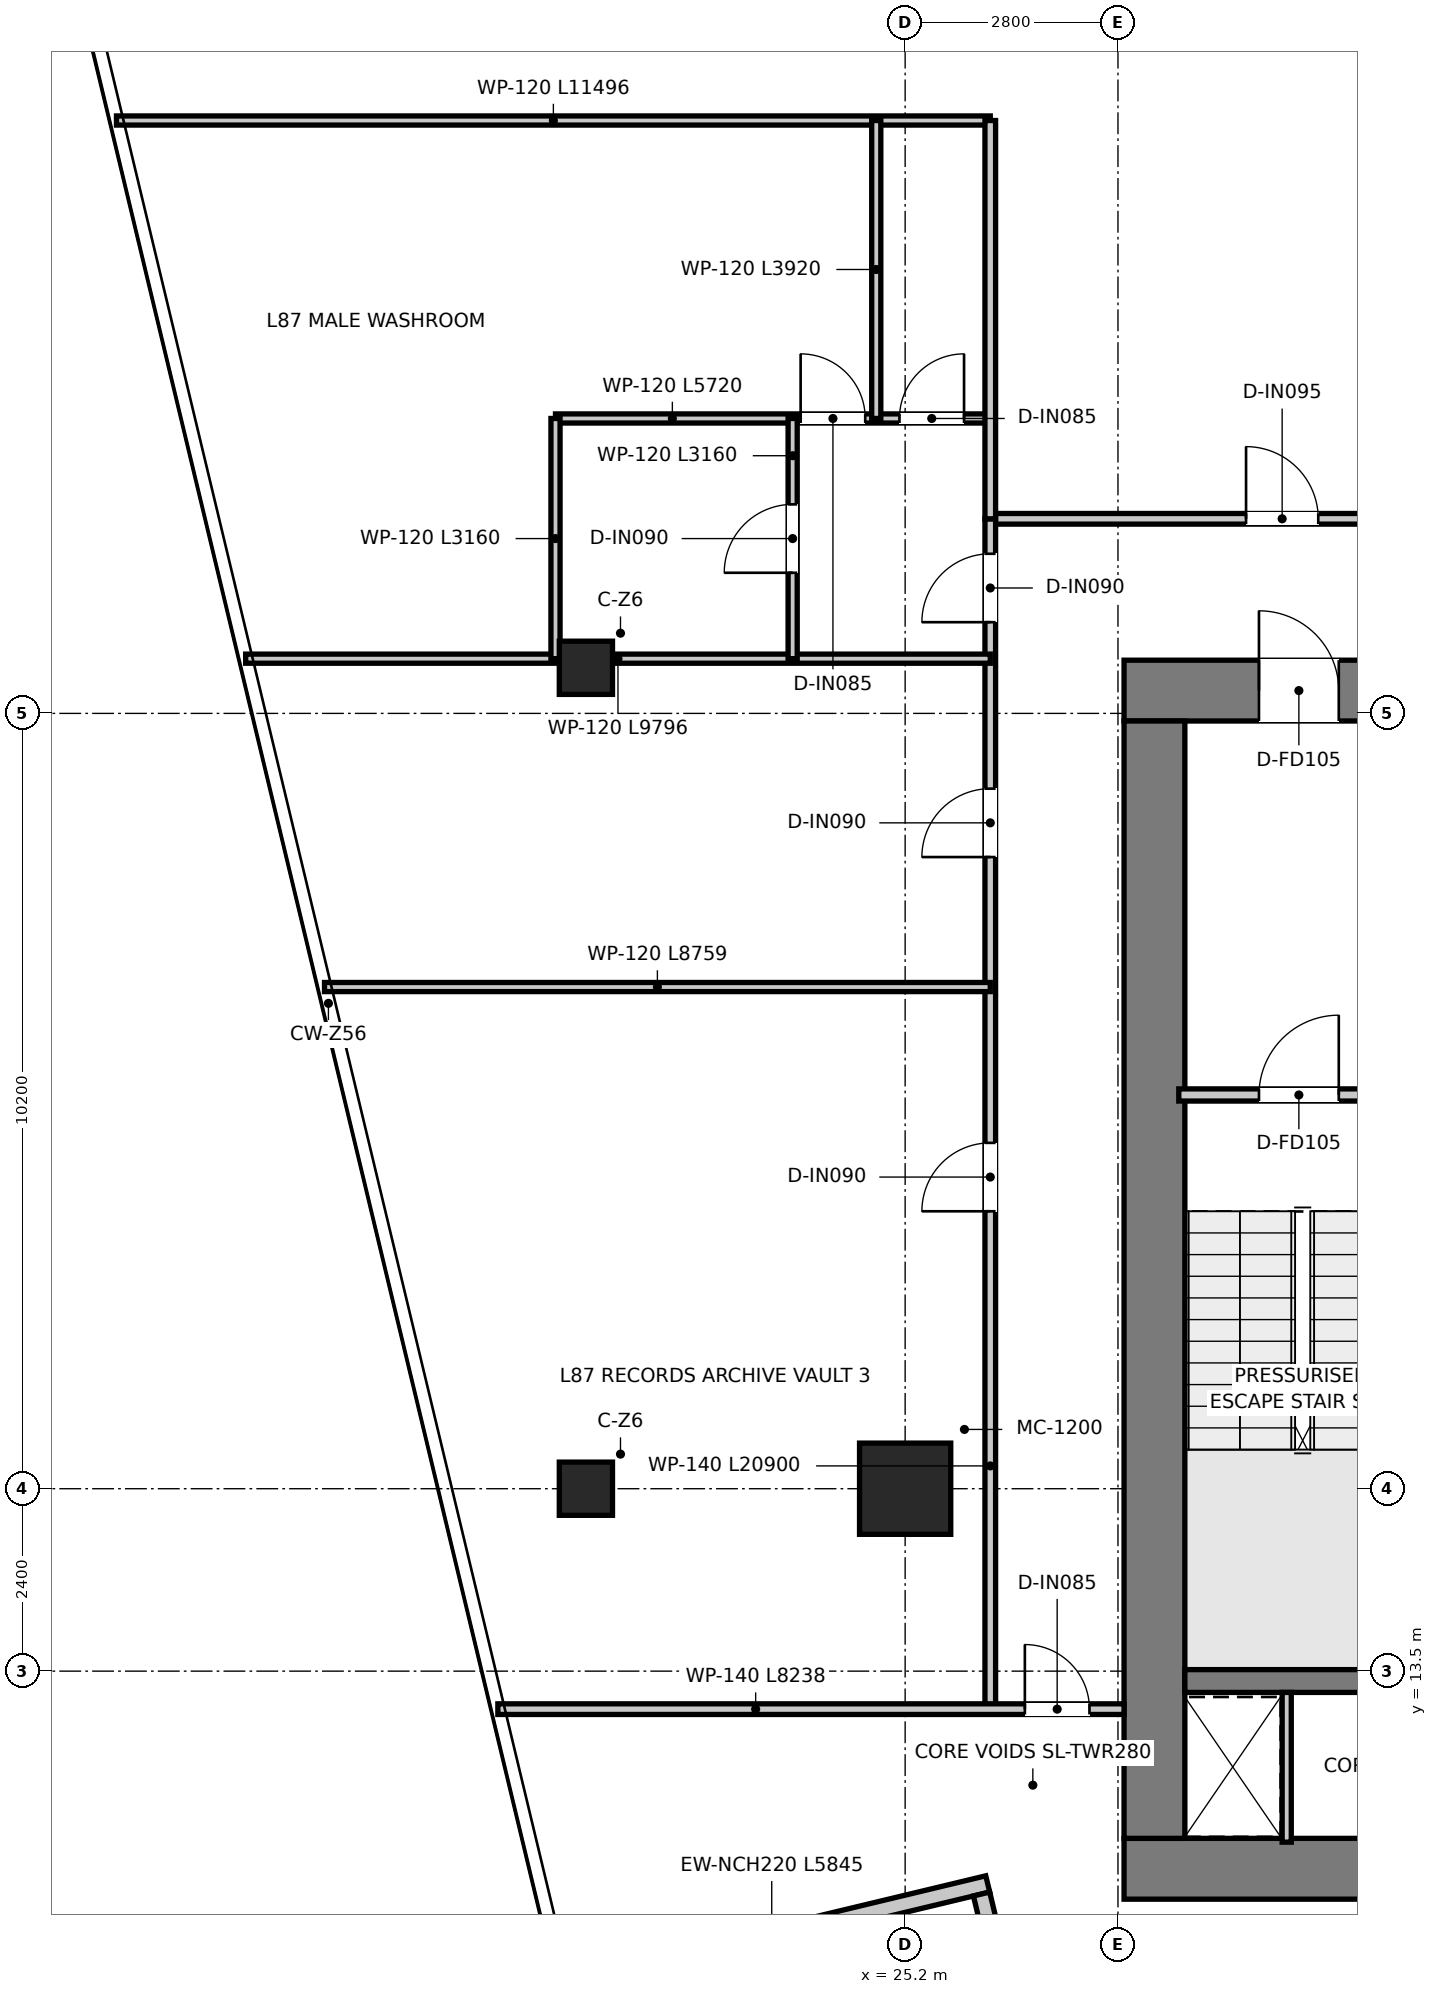
"""IFC4 building model, lengths in metres.
Left out: names, types, materials, properties, quantities, classifications, styles, units other than length and angle.
Written with IfcOpenShell. Run it as: python <this file> out.ifc"""

import sys

from ifc_helpers import new_model, si_unit, direction, frame, frame_2d, origin, origin_2d, place, context, subcontext, project, spatial, rectangle, extrude, source, transform, mapped, element, fill, save


model = new_model("IFC4")
c1 = context("Model", 3, precision=1e-05, world=origin(), true_north=direction((0.0, 1.0)))
c2 = subcontext(c1, "Body", "Model", "MODEL_VIEW")
j1 = project(units=[si_unit("LENGTHUNIT", "METRE"), si_unit("PLANEANGLEUNIT", "RADIAN")], contexts=[c1])
p1 = place(None, origin())
s1 = spatial("IfcSite", under=j1, at=p1, CompositionType="ELEMENT")
p2 = place(p1, origin())
s2 = spatial("IfcBuilding", under=s1, at=p2, CompositionType="ELEMENT")
p3 = place(p2, frame((0.0, 0.0, 355.35)))
s3 = spatial("IfcBuildingStorey", under=s2, at=p3, CompositionType="ELEMENT", Elevation=355.35)
p4 = place(p3, frame((28.08, 10.9, 0.0), z_axis=(0.0, 0.0, 1.0), x_axis=(1.0, 0.0, 0.0)))
e1 = element("IfcWall", 1, at=p4, inside=s3, PredefinedType="SHEAR", context=c2, shape_type="SweptSolid", body=[
    extrude(rectangle(XDim=15.84, YDim=0.8, at=frame_2d((7.92, 0.0))), origin(), (0.0, 0.0, 1.0), 3.95),
])
p5 = place(p3, frame((28.08, 26.4, 0.0), z_axis=(0.0, 0.0, 1.0), x_axis=(1.0, 0.0, 0.0)))
e2 = element("IfcWall", 2, at=p5, inside=s3, PredefinedType="SHEAR", context=c2, shape_type="SweptSolid", body=[
    extrude(rectangle(XDim=15.84, YDim=0.8, at=frame_2d((7.92, 0.0))), origin(), (0.0, 0.0, 1.0), 3.95),
])
p6 = place(p5, frame((7.22, 0.0, 0.0)))
e3 = element("IfcOpeningElement", 3, at=p6, cuts=e2, PredefinedType="OPENING", context=c2, shape_type="SweptSolid", body=[
    extrude(rectangle(XDim=1.4, YDim=2.2, at=frame_2d((0.7, 1.1))), frame((0.0, 0.41, 0.0), z_axis=(0.0, -1.0, 0.0), x_axis=(1.0, 0.0, 0.0)), (0.0, 0.0, 1.0), 0.82),
])
p7 = place(p5, frame((1.775, 0.0, 0.0)))
e4 = element("IfcOpeningElement", 4, at=p7, cuts=e2, PredefinedType="OPENING", context=c2, shape_type="SweptSolid", body=[
    extrude(rectangle(XDim=1.05, YDim=2.1, at=frame_2d((0.525, 1.05))), frame((0.0, 0.41, 0.0), z_axis=(0.0, -1.0, 0.0), x_axis=(1.0, 0.0, 0.0)), (0.0, 0.0, 1.0), 0.82),
])
p8 = place(p5, frame((13.015, 0.0, 0.0)))
e5 = element("IfcOpeningElement", 5, at=p8, cuts=e2, PredefinedType="OPENING", context=c2, shape_type="SweptSolid", body=[
    extrude(rectangle(XDim=1.05, YDim=2.1, at=frame_2d((0.525, 1.05))), frame((0.0, 0.41, 0.0), z_axis=(0.0, -1.0, 0.0), x_axis=(1.0, 0.0, 0.0)), (0.0, 0.0, 1.0), 0.82),
])
p9 = place(p3, frame((28.48, 11.3, 0.0), z_axis=(0.0, 0.0, 1.0), x_axis=(0.0, 1.0, 0.0)))
e6 = element("IfcWall", 6, at=p9, inside=s3, PredefinedType="SHEAR", context=c2, shape_type="SweptSolid", body=[
    extrude(rectangle(XDim=14.7, YDim=0.8, at=frame_2d((7.35, 0.0))), origin(), (0.0, 0.0, 1.0), 3.95),
])
p10 = place(p3, frame((28.88, 13.37, 0.0), z_axis=(0.0, 0.0, 1.0), x_axis=(1.0, 0.0, 0.0)))
e7 = element("IfcWall", 7, at=p10, inside=s3, PredefinedType="SHEAR", context=c2, shape_type="SweptSolid", body=[
    extrude(rectangle(XDim=3.1, YDim=0.3, at=frame_2d((1.55, 0.0))), origin(), (0.0, 0.0, 1.0), 3.95),
])
m1 = source(origin(), c2, "Body", "SweptSolid", [
    extrude(rectangle(XDim=1.2, YDim=1.2, at=origin_2d()), origin(), (0.0, 0.0, 1.0), 3.95),
])
p11 = place(p3, frame((25.2, 15.9, 0.0), z_axis=(0.0, 0.0, 1.0), x_axis=(1.0, 0.0, 0.0)))
e8 = element("IfcColumn", 8, at=p11, inside=s3, PredefinedType="USERDEFINED", context=c2, shape_type="MappedRepresentation", body=[
    mapped(m1, transform((0.0, 0.0, 0.0), x_axis=(1.0, 0.0, 0.0), y_axis=(0.0, 1.0, 0.0), z_axis=(0.0, 0.0, 1.0), scale=1.0)),
])
m2 = source(origin(), c2, "Body", "SweptSolid", [
    extrude(rectangle(XDim=0.7, YDim=0.7, at=origin_2d()), origin(), (0.0, 0.0, 1.0), 3.95),
])
for number, where, z_axis, x_axis in (
    (9, (21.0, 15.9, 0.0), (0.0, 0.0, 1.0), (1.0, 0.0, 0.0)),
    (10, (21.0, 26.7, 0.0), (0.0, 0.0, 1.0), (1.0, 0.0, 0.0)),
):
    element("IfcColumn", number, at=place(p3, frame(where, z_axis=z_axis, x_axis=x_axis)), inside=s3, PredefinedType="COLUMN", context=c2, shape_type="MappedRepresentation", body=[
        mapped(m2, transform((0.0, 0.0, 0.0), x_axis=(1.0, 0.0, 0.0), y_axis=(0.0, 1.0, 0.0), z_axis=(0.0, 0.0, 1.0), scale=1.0)),
    ])
p12 = place(p3, frame((20.603, 9.336, 0.0), z_axis=(0.0, 0.0, 1.0), x_axis=(0.972367961768, 0.233453521986, 0.0)))
e11 = element("IfcWall", 11, at=p12, inside=s3, PredefinedType="ELEMENTEDWALL", context=c2, shape_type="SweptSolid", body=[
    extrude(rectangle(XDim=5.845, YDim=0.22, at=frame_2d((2.922, 0.0))), origin(), (0.0, 0.0, 1.0), 3.67),
])
p13 = place(p3, frame((26.205, 10.568, 0.0), z_axis=(0.0, 0.0, 1.0), x_axis=(0.233456668573, -0.972367206306, 0.0)))
e12 = element("IfcWall", 12, at=p13, inside=s3, PredefinedType="ELEMENTEDWALL", context=c2, shape_type="SweptSolid", body=[
    extrude(rectangle(XDim=5.625, YDim=0.22, at=frame_2d((2.812, 0.0))), origin(), (0.0, 0.0, 1.0), 3.67),
])
p14 = place(p3, frame((28.8, 21.08, 0.0), z_axis=(0.0, 0.0, 1.0), x_axis=(1.0, 0.0, 0.0)))
e13 = element("IfcWall", 13, at=p14, inside=s3, PredefinedType="PARTITIONING", context=c2, shape_type="SweptSolid", body=[
    extrude(rectangle(XDim=3.16, YDim=0.16, at=frame_2d((1.58, 0.0))), origin(), (0.0, 0.0, 1.0), 3.67),
])
p15 = place(p14, frame((1.055, 0.0, 0.0)))
e14 = element("IfcOpeningElement", 14, at=p15, cuts=e13, PredefinedType="OPENING", context=c2, shape_type="SweptSolid", body=[
    extrude(rectangle(XDim=1.05, YDim=2.1, at=frame_2d((0.525, 1.05))), frame((0.0, 0.09, 0.0), z_axis=(0.0, -1.0, 0.0), x_axis=(1.0, 0.0, 0.0)), (0.0, 0.0, 1.0), 0.18),
])
p16 = place(p3, frame((30.22, 11.25, 0.0), z_axis=(0.0, 0.0, 1.0), x_axis=(0.0, 1.0, 0.0)))
e15 = element("IfcWall", 15, at=p16, inside=s3, PredefinedType="PARTITIONING", context=c2, shape_type="SweptSolid", body=[
    extrude(rectangle(XDim=1.97, YDim=0.12, at=frame_2d((0.985, 0.0))), origin(), (0.0, 0.0, 1.0), 3.67),
])
p17 = place(p3, frame((26.32, 28.66, 0.0), z_axis=(0.0, 0.0, 1.0), x_axis=(1.0, 0.0, 0.0)))
e16 = element("IfcWall", 16, at=p17, inside=s3, PredefinedType="PARTITIONING", context=c2, shape_type="SweptSolid", body=[
    extrude(rectangle(XDim=19.36, YDim=0.14, at=frame_2d((9.68, 0.0))), origin(), (0.0, 0.0, 1.0), 3.18),
])
p18 = place(p17, frame((3.365, 0.0, 0.0)))
e17 = element("IfcOpeningElement", 17, at=p18, cuts=e16, PredefinedType="OPENING", context=c2, shape_type="SweptSolid", body=[
    extrude(rectangle(XDim=0.95, YDim=2.1, at=frame_2d((0.475, 1.05))), frame((0.0, 0.08, 0.0), z_axis=(0.0, -1.0, 0.0), x_axis=(1.0, 0.0, 0.0)), (0.0, 0.0, 1.0), 0.16),
])
p19 = place(p17, frame((13.045, 0.0, 0.0)))
e18 = element("IfcOpeningElement", 18, at=p19, cuts=e16, PredefinedType="OPENING", context=c2, shape_type="SweptSolid", body=[
    extrude(rectangle(XDim=0.95, YDim=2.1, at=frame_2d((0.475, 1.05))), frame((0.0, 0.08, 0.0), z_axis=(0.0, -1.0, 0.0), x_axis=(1.0, 0.0, 0.0)), (0.0, 0.0, 1.0), 0.16),
])
p20 = place(p3, frame((26.32, 13.0, 0.0), z_axis=(0.0, 0.0, 1.0), x_axis=(0.0, 1.0, 0.0)))
e19 = element("IfcWall", 19, at=p20, inside=s3, PredefinedType="PARTITIONING", context=c2, shape_type="SweptSolid", body=[
    extrude(rectangle(XDim=15.66, YDim=0.14, at=frame_2d((7.83, 0.0))), origin(), (0.0, 0.0, 1.0), 3.13),
])
p21 = place(p20, frame((14.3, 0.0, 0.0)))
e20 = element("IfcOpeningElement", 20, at=p21, cuts=e19, PredefinedType="OPENING", context=c2, shape_type="SweptSolid", body=[
    extrude(rectangle(XDim=0.9, YDim=2.1, at=frame_2d((0.45, 1.05))), frame((0.0, 0.08, 0.0), z_axis=(0.0, -1.0, 0.0), x_axis=(1.0, 0.0, 0.0)), (0.0, 0.0, 1.0), 0.16),
])
p22 = place(p20, frame((6.55, 0.0, 0.0)))
e21 = element("IfcOpeningElement", 21, at=p22, cuts=e19, PredefinedType="OPENING", context=c2, shape_type="SweptSolid", body=[
    extrude(rectangle(XDim=0.9, YDim=2.1, at=frame_2d((0.45, 1.05))), frame((0.0, 0.08, 0.0), z_axis=(0.0, -1.0, 0.0), x_axis=(1.0, 0.0, 0.0)), (0.0, 0.0, 1.0), 0.16),
])
p23 = place(p20, frame((11.21, 0.0, 0.0)))
e22 = element("IfcOpeningElement", 22, at=p23, cuts=e19, PredefinedType="OPENING", context=c2, shape_type="SweptSolid", body=[
    extrude(rectangle(XDim=0.9, YDim=2.1, at=frame_2d((0.45, 1.05))), frame((0.0, 0.08, 0.0), z_axis=(0.0, -1.0, 0.0), x_axis=(1.0, 0.0, 0.0)), (0.0, 0.0, 1.0), 0.16),
])
p24 = place(p3, frame((19.842, 13.0, 0.0), z_axis=(0.0, 0.0, 1.0), x_axis=(1.0, 0.0, 0.0)))
e23 = element("IfcWall", 23, at=p24, inside=s3, PredefinedType="PARTITIONING", context=c2, shape_type="SweptSolid", body=[
    extrude(rectangle(XDim=8.238, YDim=0.14, at=frame_2d((4.119, 0.0))), origin(), (0.0, 0.0, 1.0), 3.18),
])
p25 = place(p24, frame((6.933, 0.0, 0.0)))
e24 = element("IfcOpeningElement", 24, at=p25, cuts=e23, PredefinedType="OPENING", context=c2, shape_type="SweptSolid", body=[
    extrude(rectangle(XDim=0.85, YDim=2.1, at=frame_2d((0.425, 1.05))), frame((0.0, 0.08, 0.0), z_axis=(0.0, -1.0, 0.0), x_axis=(1.0, 0.0, 0.0)), (0.0, 0.0, 1.0), 0.16),
])
p26 = place(p3, frame((16.524, 26.82, 0.0), z_axis=(0.0, 0.0, 1.0), x_axis=(1.0, 0.0, 0.0)))
e25 = element("IfcWall", 25, at=p26, inside=s3, PredefinedType="PARTITIONING", context=c2, shape_type="SweptSolid", body=[
    extrude(rectangle(XDim=9.796, YDim=0.12, at=frame_2d((4.898, 0.0))), origin(), (0.0, 0.0, 1.0), 3.13),
])
p27 = place(p3, frame((14.824, 33.9, 0.0), z_axis=(0.0, 0.0, 1.0), x_axis=(1.0, 0.0, 0.0)))
e26 = element("IfcWall", 26, at=p27, inside=s3, PredefinedType="PARTITIONING", context=c2, shape_type="SweptSolid", body=[
    extrude(rectangle(XDim=11.496, YDim=0.12, at=frame_2d((5.748, 0.0))), origin(), (0.0, 0.0, 1.0), 3.13),
])
p28 = place(p3, frame((20.6, 29.98, 0.0), z_axis=(0.0, 0.0, 1.0), x_axis=(1.0, 0.0, 0.0)))
e27 = element("IfcWall", 27, at=p28, inside=s3, PredefinedType="PARTITIONING", context=c2, shape_type="SweptSolid", body=[
    extrude(rectangle(XDim=5.72, YDim=0.12, at=frame_2d((2.86, 0.0))), origin(), (0.0, 0.0, 1.0), 3.13),
])
p29 = place(p28, frame((3.225, 0.0, 0.0)))
e28 = element("IfcOpeningElement", 28, at=p29, cuts=e27, PredefinedType="OPENING", context=c2, shape_type="SweptSolid", body=[
    extrude(rectangle(XDim=0.85, YDim=2.1, at=frame_2d((0.425, 1.05))), frame((0.0, 0.07, 0.0), z_axis=(0.0, -1.0, 0.0), x_axis=(1.0, 0.0, 0.0)), (0.0, 0.0, 1.0), 0.14),
])
p30 = place(p28, frame((4.525, 0.0, 0.0)))
e29 = element("IfcOpeningElement", 29, at=p30, cuts=e27, PredefinedType="OPENING", context=c2, shape_type="SweptSolid", body=[
    extrude(rectangle(XDim=0.85, YDim=2.1, at=frame_2d((0.425, 1.05))), frame((0.0, 0.07, 0.0), z_axis=(0.0, -1.0, 0.0), x_axis=(1.0, 0.0, 0.0)), (0.0, 0.0, 1.0), 0.14),
])
p31 = place(p3, frame((20.6, 26.82, 0.0), z_axis=(0.0, 0.0, 1.0), x_axis=(0.0, 1.0, 0.0)))
e30 = element("IfcWall", 30, at=p31, inside=s3, PredefinedType="PARTITIONING", context=c2, shape_type="SweptSolid", body=[
    extrude(rectangle(XDim=3.16, YDim=0.12, at=frame_2d((1.58, 0.0))), origin(), (0.0, 0.0, 1.0), 3.67),
])
p32 = place(p3, frame((23.72, 26.82, 0.0), z_axis=(0.0, 0.0, 1.0), x_axis=(0.0, 1.0, 0.0)))
e31 = element("IfcWall", 31, at=p32, inside=s3, PredefinedType="PARTITIONING", context=c2, shape_type="SweptSolid", body=[
    extrude(rectangle(XDim=3.16, YDim=0.12, at=frame_2d((1.58, 0.0))), origin(), (0.0, 0.0, 1.0), 3.18),
])
p33 = place(p32, frame((1.13, 0.0, 0.0)))
e32 = element("IfcOpeningElement", 32, at=p33, cuts=e31, PredefinedType="OPENING", context=c2, shape_type="SweptSolid", body=[
    extrude(rectangle(XDim=0.9, YDim=2.1, at=frame_2d((0.45, 1.05))), frame((0.0, 0.07, 0.0), z_axis=(0.0, -1.0, 0.0), x_axis=(1.0, 0.0, 0.0)), (0.0, 0.0, 1.0), 0.14),
])
p34 = place(p3, frame((24.82, 29.98, 0.0), z_axis=(0.0, 0.0, 1.0), x_axis=(0.0, 1.0, 0.0)))
e33 = element("IfcWall", 33, at=p34, inside=s3, PredefinedType="PARTITIONING", context=c2, shape_type="SweptSolid", body=[
    extrude(rectangle(XDim=3.92, YDim=0.12, at=frame_2d((1.96, 0.0))), origin(), (0.0, 0.0, 1.0), 3.37),
])
p35 = place(p3, frame((26.32, 28.66, 0.0), z_axis=(0.0, 0.0, 1.0), x_axis=(0.0, 1.0, 0.0)))
e34 = element("IfcWall", 34, at=p35, inside=s3, PredefinedType="PARTITIONING", context=c2, shape_type="SweptSolid", body=[
    extrude(rectangle(XDim=5.24, YDim=0.14, at=frame_2d((2.62, 0.0))), origin(), (0.0, 0.0, 1.0), 3.43),
])
p36 = place(p3, frame((17.561, 22.5, 0.0), z_axis=(0.0, 0.0, 1.0), x_axis=(1.0, 0.0, 0.0)))
e35 = element("IfcWall", 35, at=p36, inside=s3, PredefinedType="PARTITIONING", context=c2, shape_type="SweptSolid", body=[
    extrude(rectangle(XDim=8.759, YDim=0.12, at=frame_2d((4.379, 0.0))), origin(), (0.0, 0.0, 1.0), 3.13),
])
p37 = place(p15, origin())
e36 = element("IfcDoor", 36, at=p37, inside=s3, OperationType="SINGLE_SWING_RIGHT", PredefinedType="DOOR", context=c2, shape_type="SweptSolid", body=[
    extrude(rectangle(XDim=1.05, YDim=2.1, at=frame_2d((0.525, 1.05))), frame((0.0, 0.025, 0.0), z_axis=(0.0, -1.0, 0.0), x_axis=(1.0, 0.0, 0.0)), (0.0, 0.0, 1.0), 0.05),
])
fill(e14, e36)
p38 = place(p7, origin())
e37 = element("IfcDoor", 37, at=p38, inside=s3, OperationType="SINGLE_SWING_LEFT", PredefinedType="DOOR", context=c2, shape_type="SweptSolid", body=[
    extrude(rectangle(XDim=1.05, YDim=2.1, at=frame_2d((0.525, 1.05))), frame((0.0, 0.025, 0.0), z_axis=(0.0, -1.0, 0.0), x_axis=(1.0, 0.0, 0.0)), (0.0, 0.0, 1.0), 0.05),
])
fill(e4, e37)
p39 = place(p21, origin())
e38 = element("IfcDoor", 38, at=p39, inside=s3, OperationType="SINGLE_SWING_LEFT", PredefinedType="DOOR", context=c2, shape_type="SweptSolid", body=[
    extrude(rectangle(XDim=0.9, YDim=2.1, at=frame_2d((0.45, 1.05))), frame((0.0, 0.025, 0.0), z_axis=(0.0, -1.0, 0.0), x_axis=(1.0, 0.0, 0.0)), (0.0, 0.0, 1.0), 0.05),
])
fill(e20, e38)
p40 = place(p29, origin())
e39 = element("IfcDoor", 39, at=p40, inside=s3, OperationType="SINGLE_SWING_LEFT", PredefinedType="DOOR", context=c2, shape_type="SweptSolid", body=[
    extrude(rectangle(XDim=0.85, YDim=2.1, at=frame_2d((0.425, 1.05))), frame((0.0, 0.025, 0.0), z_axis=(0.0, -1.0, 0.0), x_axis=(1.0, 0.0, 0.0)), (0.0, 0.0, 1.0), 0.05),
])
fill(e28, e39)
p41 = place(p30, origin())
e40 = element("IfcDoor", 40, at=p41, inside=s3, OperationType="SINGLE_SWING_RIGHT", PredefinedType="DOOR", context=c2, shape_type="SweptSolid", body=[
    extrude(rectangle(XDim=0.85, YDim=2.1, at=frame_2d((0.425, 1.05))), frame((0.0, 0.025, 0.0), z_axis=(0.0, -1.0, 0.0), x_axis=(1.0, 0.0, 0.0)), (0.0, 0.0, 1.0), 0.05),
])
fill(e29, e40)
p42 = place(p33, origin())
e41 = element("IfcDoor", 41, at=p42, inside=s3, OperationType="SINGLE_SWING_LEFT", PredefinedType="DOOR", context=c2, shape_type="SweptSolid", body=[
    extrude(rectangle(XDim=0.9, YDim=2.1, at=frame_2d((0.45, 1.05))), frame((0.0, 0.025, 0.0), z_axis=(0.0, -1.0, 0.0), x_axis=(1.0, 0.0, 0.0)), (0.0, 0.0, 1.0), 0.05),
])
fill(e32, e41)
p43 = place(p18, origin())
e42 = element("IfcDoor", 42, at=p43, inside=s3, OperationType="SINGLE_SWING_LEFT", PredefinedType="DOOR", context=c2, shape_type="SweptSolid", body=[
    extrude(rectangle(XDim=0.95, YDim=2.1, at=frame_2d((0.475, 1.05))), frame((0.0, 0.025, 0.0), z_axis=(0.0, -1.0, 0.0), x_axis=(1.0, 0.0, 0.0)), (0.0, 0.0, 1.0), 0.05),
])
fill(e17, e42)
p44 = place(p22, origin())
e43 = element("IfcDoor", 43, at=p44, inside=s3, OperationType="SINGLE_SWING_LEFT", PredefinedType="DOOR", context=c2, shape_type="SweptSolid", body=[
    extrude(rectangle(XDim=0.9, YDim=2.1, at=frame_2d((0.45, 1.05))), frame((0.0, 0.025, 0.0), z_axis=(0.0, -1.0, 0.0), x_axis=(1.0, 0.0, 0.0)), (0.0, 0.0, 1.0), 0.05),
])
fill(e21, e43)
p45 = place(p23, origin())
e44 = element("IfcDoor", 44, at=p45, inside=s3, OperationType="SINGLE_SWING_LEFT", PredefinedType="DOOR", context=c2, shape_type="SweptSolid", body=[
    extrude(rectangle(XDim=0.9, YDim=2.1, at=frame_2d((0.45, 1.05))), frame((0.0, 0.025, 0.0), z_axis=(0.0, -1.0, 0.0), x_axis=(1.0, 0.0, 0.0)), (0.0, 0.0, 1.0), 0.05),
])
fill(e22, e44)
p46 = place(p25, origin())
e45 = element("IfcDoor", 45, at=p46, inside=s3, OperationType="SINGLE_SWING_LEFT", PredefinedType="DOOR", context=c2, shape_type="SweptSolid", body=[
    extrude(rectangle(XDim=0.85, YDim=2.1, at=frame_2d((0.425, 1.05))), frame((0.0, 0.025, 0.0), z_axis=(0.0, -1.0, 0.0), x_axis=(1.0, 0.0, 0.0)), (0.0, 0.0, 1.0), 0.05),
])
fill(e24, e45)
save(model, sys.argv[1])
